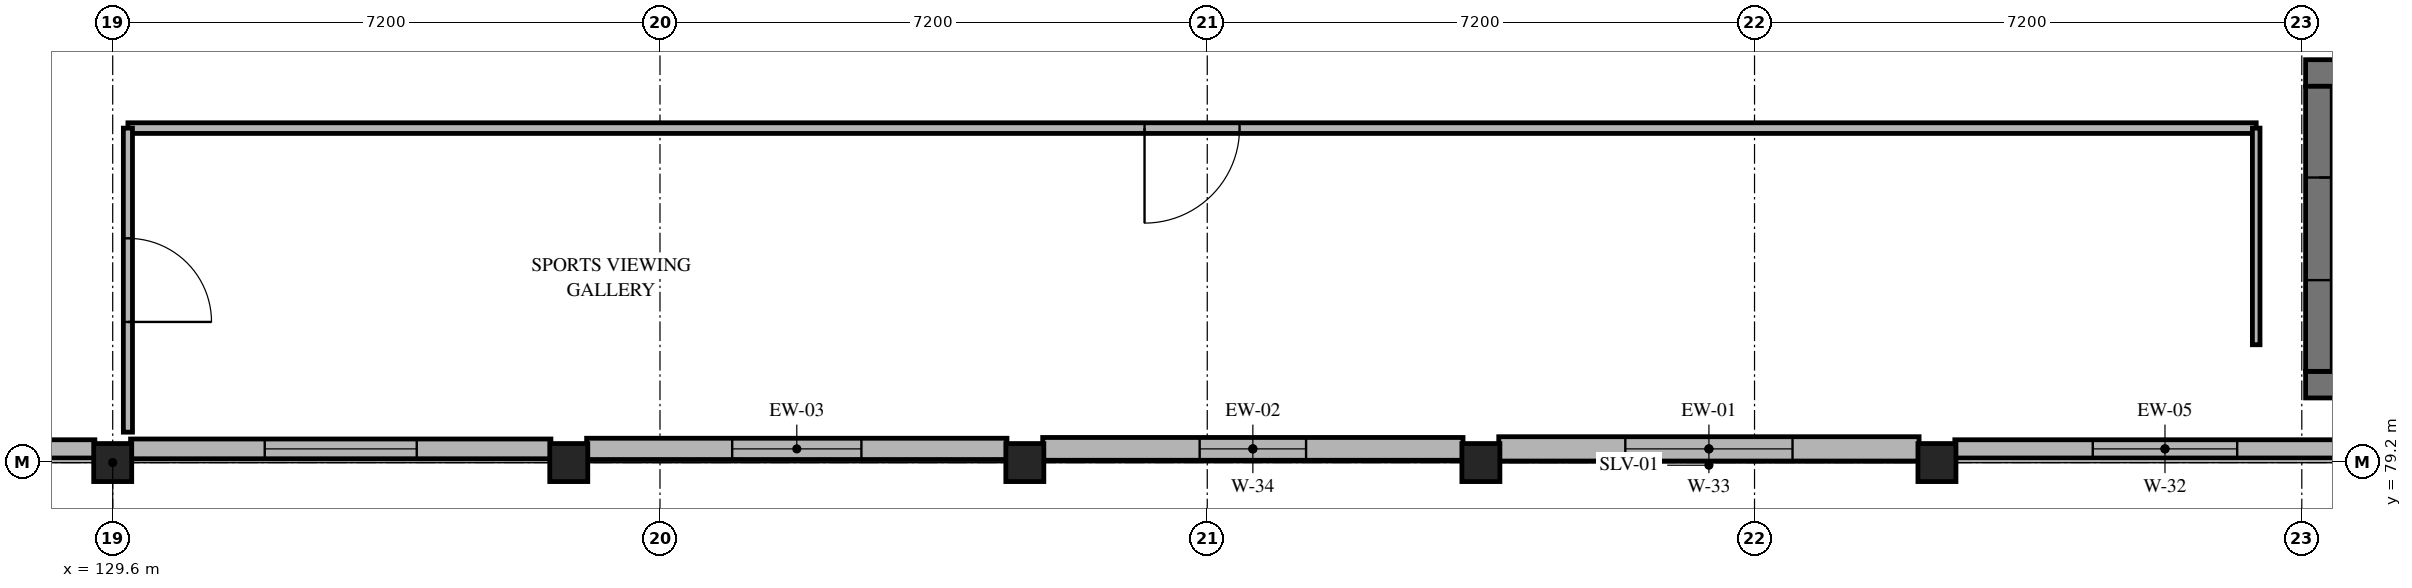
"""IFC4 building model, lengths in metres.
Left out: names, types, materials, properties, quantities, classifications, styles, units other than length and angle.
Written with IfcOpenShell. Run it as: python <this file> out.ifc"""

import sys

from ifc_helpers import new_model, si_unit, direction, frame, frame_2d, origin, origin_2d, place, context, subcontext, project, spatial, rectangle, extrude, element, fill, save


model = new_model("IFC4")
c1 = context("Model", 3, precision=1e-05, world=origin(), true_north=direction((0.0, 1.0)))
c2 = subcontext(c1, "Body", "Model", "MODEL_VIEW")
j1 = project(units=[si_unit("LENGTHUNIT", "METRE"), si_unit("PLANEANGLEUNIT", "RADIAN")], contexts=[c1])
p1 = place(None, origin())
s1 = spatial("IfcSite", under=j1, at=p1, CompositionType="ELEMENT")
p2 = place(p1, origin())
s2 = spatial("IfcBuilding", under=s1, at=p2, CompositionType="ELEMENT")
p3 = place(p2, frame((0.0, 0.0, 4.5)))
s3 = spatial("IfcBuildingStorey", under=s2, at=p3, CompositionType="ELEMENT", Elevation=4.5)
for number, where, z_axis, x_axis in (
    (1, (129.6, 79.2, 0.0), (0.0, 0.0, 1.0), (1.0, 0.0, 0.0)),
    (2, (135.6, 79.2, 0.0), (0.0, 0.0, 1.0), (1.0, 0.0, 0.0)),
    (3, (141.6, 79.2, 0.0), (0.0, 0.0, 1.0), (1.0, 0.0, 0.0)),
    (4, (147.6, 79.2, 0.0), (0.0, 0.0, 1.0), (1.0, 0.0, 0.0)),
    (5, (153.6, 79.2, 0.0), (0.0, 0.0, 1.0), (1.0, 0.0, 0.0)),
):
    element("IfcColumn", number, at=place(p3, frame(where, z_axis=z_axis, x_axis=x_axis)), inside=s3, PredefinedType="COLUMN", context=c2, shape_type="SweptSolid", body=[
        extrude(rectangle(XDim=0.5, YDim=0.5, at=origin_2d()), origin(), (0.0, 0.0, 1.0), 4.2),
    ])
p4 = place(p3, frame((159.365, 79.38, 0.0), z_axis=(0.0, 0.0, 1.0), x_axis=(-1.0, 0.0, 0.0)))
e6 = element("IfcWall", 6, at=p4, inside=s3, PredefinedType="SOLIDWALL", context=c2, shape_type="SweptSolid", body=[
    extrude(rectangle(XDim=5.53, YDim=0.24, at=frame_2d((2.765, 0.0))), origin(), (0.0, 0.0, 1.0), 3.59),
])
p5 = place(p4, frame((1.815, 0.0, 0.75)))
e7 = element("IfcOpeningElement", 7, at=p5, cuts=e6, PredefinedType="OPENING", context=c2, shape_type="SweptSolid", body=[
    extrude(rectangle(XDim=1.9, YDim=1.45, at=frame_2d((0.95, 0.725))), frame((0.0, 0.13, 0.0), z_axis=(0.0, -1.0, 0.0), x_axis=(1.0, 0.0, 0.0)), (0.0, 0.0, 1.0), 0.26),
])
p6 = place(p3, frame((153.365, 79.38, 0.0), z_axis=(0.0, 0.0, 1.0), x_axis=(-1.0, 0.0, 0.0)))
e8 = element("IfcWall", 8, at=p6, inside=s3, PredefinedType="SOLIDWALL", context=c2, shape_type="SweptSolid", body=[
    extrude(rectangle(XDim=5.53, YDim=0.32, at=frame_2d((2.765, 0.0))), origin(), (0.0, 0.0, 1.0), 3.59),
])
p7 = place(p6, frame((1.665, 0.0, 0.75)))
e9 = element("IfcOpeningElement", 9, at=p7, cuts=e8, PredefinedType="OPENING", context=c2, shape_type="SweptSolid", body=[
    extrude(rectangle(XDim=2.2, YDim=1.45, at=frame_2d((1.1, 0.725))), frame((0.0, 0.17, 0.0), z_axis=(0.0, -1.0, 0.0), x_axis=(1.0, 0.0, 0.0)), (0.0, 0.0, 1.0), 0.34),
])
p8 = place(p3, frame((147.365, 79.38, 0.0), z_axis=(0.0, 0.0, 1.0), x_axis=(-1.0, 0.0, 0.0)))
e10 = element("IfcWall", 10, at=p8, inside=s3, PredefinedType="SOLIDWALL", context=c2, shape_type="SweptSolid", body=[
    extrude(rectangle(XDim=5.53, YDim=0.3, at=frame_2d((2.765, 0.0))), origin(), (0.0, 0.0, 1.0), 3.59),
])
p9 = place(p8, frame((2.065, 0.0, 0.9)))
e11 = element("IfcOpeningElement", 11, at=p9, cuts=e10, PredefinedType="OPENING", context=c2, shape_type="SweptSolid", body=[
    extrude(rectangle(XDim=1.4, YDim=0.85, at=frame_2d((0.7, 0.425))), frame((0.0, 0.16, 0.0), z_axis=(0.0, -1.0, 0.0), x_axis=(1.0, 0.0, 0.0)), (0.0, 0.0, 1.0), 0.32),
])
p10 = place(p3, frame((141.365, 79.38, 0.0), z_axis=(0.0, 0.0, 1.0), x_axis=(-1.0, 0.0, 0.0)))
e12 = element("IfcWall", 12, at=p10, inside=s3, PredefinedType="SOLIDWALL", context=c2, shape_type="SweptSolid", body=[
    extrude(rectangle(XDim=5.53, YDim=0.28, at=frame_2d((2.765, 0.0))), origin(), (0.0, 0.0, 1.0), 3.59),
])
p11 = place(p10, frame((1.915, 0.0, 0.9)))
e13 = element("IfcOpeningElement", 13, at=p11, cuts=e12, PredefinedType="OPENING", context=c2, shape_type="SweptSolid", body=[
    extrude(rectangle(XDim=1.7, YDim=0.85, at=frame_2d((0.85, 0.425))), frame((0.0, 0.15, 0.0), z_axis=(0.0, -1.0, 0.0), x_axis=(1.0, 0.0, 0.0)), (0.0, 0.0, 1.0), 0.3),
])
p12 = place(p3, frame((135.365, 79.38, 0.0), z_axis=(0.0, 0.0, 1.0), x_axis=(-1.0, 0.0, 0.0)))
e14 = element("IfcWall", 14, at=p12, inside=s3, PredefinedType="SOLIDWALL", context=c2, shape_type="SweptSolid", body=[
    extrude(rectangle(XDim=5.53, YDim=0.26, at=frame_2d((2.765, 0.0))), origin(), (0.0, 0.0, 1.0), 3.59),
])
p13 = place(p12, frame((1.765, 0.0, 0.9)))
e15 = element("IfcOpeningElement", 15, at=p13, cuts=e14, PredefinedType="OPENING", context=c2, shape_type="SweptSolid", body=[
    extrude(rectangle(XDim=2.0, YDim=0.85, at=frame_2d((1.0, 0.425))), frame((0.0, 0.14, 0.0), z_axis=(0.0, -1.0, 0.0), x_axis=(1.0, 0.0, 0.0)), (0.0, 0.0, 1.0), 0.28),
])
p14 = place(p3, frame((129.365, 79.38, 0.0), z_axis=(0.0, 0.0, 1.0), x_axis=(-1.0, 0.0, 0.0)))
e16 = element("IfcWall", 16, at=p14, inside=s3, PredefinedType="SOLIDWALL", context=c2, shape_type="SweptSolid", body=[
    extrude(rectangle(XDim=6.73, YDim=0.24, at=frame_2d((3.365, 0.0))), origin(), (0.0, 0.0, 1.0), 3.5),
])
p15 = place(p14, frame((2.915, 0.0, 0.9)))
e17 = element("IfcOpeningElement", 17, at=p15, cuts=e16, PredefinedType="OPENING", context=c2, shape_type="SweptSolid", body=[
    extrude(rectangle(XDim=0.9, YDim=1.2, at=frame_2d((0.45, 0.6))), frame((0.0, 0.13, 0.0), z_axis=(0.0, -1.0, 0.0), x_axis=(1.0, 0.0, 0.0)), (0.0, 0.0, 1.0), 0.26),
])
for number, where, z_axis, x_axis in (
    (18, (158.45, 80.225, 0.0), (0.0, 0.0, 1.0), (1.0, 0.0, 0.0)),
    (19, (167.55, 84.325, 0.0), (0.0, 0.0, 1.0), (-1.0, 0.0, 0.0)),
):
    element("IfcWall", number, at=place(p3, frame(where, z_axis=z_axis, x_axis=x_axis)), inside=s3, PredefinedType="SHEAR", context=c2, shape_type="SweptSolid", body=[
        extrude(rectangle(XDim=9.1, YDim=0.35, at=frame_2d((4.55, 0.0))), origin(), (0.0, 0.0, 1.0), 3.95),
    ])
p16 = place(p3, frame((158.625, 84.15, 0.0), z_axis=(0.0, 0.0, 1.0), x_axis=(0.0, -1.0, 0.0)))
e20 = element("IfcWall", 20, at=p16, inside=s3, PredefinedType="SHEAR", context=c2, shape_type="SweptSolid", body=[
    extrude(rectangle(XDim=3.75, YDim=0.35, at=frame_2d((1.875, 0.0))), origin(), (0.0, 0.0, 1.0), 3.95),
])
p17 = place(p16, frame((1.2, 0.0, 0.0)))
e21 = element("IfcOpeningElement", 21, at=p17, cuts=e20, PredefinedType="OPENING", context=c2, shape_type="SweptSolid", body=[
    extrude(rectangle(XDim=1.35, YDim=2.2, at=frame_2d((0.675, 1.1))), frame((0.0, 0.185, 0.0), z_axis=(0.0, -1.0, 0.0), x_axis=(1.0, 0.0, 0.0)), (0.0, 0.0, 1.0), 0.37),
])
p18 = place(p3, frame((157.8, 83.6, 0.0), z_axis=(0.0, 0.0, 1.0), x_axis=(-1.0, 0.0, 0.0)))
e22 = element("IfcWall", 22, at=p18, inside=s3, PredefinedType="PARTITIONING", context=c2, shape_type="SweptSolid", body=[
    extrude(rectangle(XDim=28.0, YDim=0.14, at=frame_2d((14.0, 0.0))), origin(), (0.0, 0.0, 1.0), 3.55),
])
p19 = place(p18, frame((13.375, 0.0, 0.0)))
e23 = element("IfcOpeningElement", 23, at=p19, cuts=e22, PredefinedType="OPENING", context=c2, shape_type="SweptSolid", body=[
    extrude(rectangle(XDim=1.25, YDim=2.2, at=frame_2d((0.625, 1.1))), frame((0.0, 0.08, 0.0), z_axis=(0.0, -1.0, 0.0), x_axis=(1.0, 0.0, 0.0)), (0.0, 0.0, 1.0), 0.16),
])
p20 = place(p3, frame((129.8, 83.6, 0.0), z_axis=(0.0, 0.0, 1.0), x_axis=(0.0, -1.0, 0.0)))
e24 = element("IfcWall", 24, at=p20, inside=s3, PredefinedType="PARTITIONING", context=c2, shape_type="SweptSolid", body=[
    extrude(rectangle(XDim=4.0, YDim=0.12, at=frame_2d((2.0, 0.0))), origin(), (0.0, 0.0, 1.0), 3.65),
])
p21 = place(p20, frame((1.45, 0.0, 0.0)))
e25 = element("IfcOpeningElement", 25, at=p21, cuts=e24, PredefinedType="OPENING", context=c2, shape_type="SweptSolid", body=[
    extrude(rectangle(XDim=1.1, YDim=2.15, at=frame_2d((0.55, 1.075))), frame((0.0, 0.07, 0.0), z_axis=(0.0, -1.0, 0.0), x_axis=(1.0, 0.0, 0.0)), (0.0, 0.0, 1.0), 0.14),
])
p22 = place(p3, frame((157.8, 80.75, 0.0), z_axis=(0.0, 0.0, 1.0), x_axis=(0.0, 1.0, 0.0)))
e26 = element("IfcWall", 26, at=p22, inside=s3, PredefinedType="PARTITIONING", context=c2, shape_type="SweptSolid", body=[
    extrude(rectangle(XDim=2.85, YDim=0.1, at=frame_2d((1.425, 0.0))), origin(), (0.0, 0.0, 1.0), 3.95),
])
p23 = place(p5, origin())
e27 = element("IfcWindow", 27, at=p23, inside=s3, PartitioningType="SINGLE_PANEL", PredefinedType="WINDOW", context=c2, shape_type="SweptSolid", body=[
    extrude(rectangle(XDim=1.9, YDim=1.45, at=frame_2d((0.95, 0.725))), frame((0.0, 0.03, 0.0), z_axis=(0.0, -1.0, 0.0), x_axis=(1.0, 0.0, 0.0)), (0.0, 0.0, 1.0), 0.06),
])
fill(e7, e27)
p24 = place(p7, origin())
e28 = element("IfcWindow", 28, at=p24, inside=s3, PartitioningType="SINGLE_PANEL", PredefinedType="WINDOW", context=c2, shape_type="SweptSolid", body=[
    extrude(rectangle(XDim=2.2, YDim=1.45, at=frame_2d((1.1, 0.725))), frame((0.0, 0.03, 0.0), z_axis=(0.0, -1.0, 0.0), x_axis=(1.0, 0.0, 0.0)), (0.0, 0.0, 1.0), 0.06),
])
fill(e9, e28)
p25 = place(p9, origin())
e29 = element("IfcWindow", 29, at=p25, inside=s3, PartitioningType="SINGLE_PANEL", PredefinedType="WINDOW", context=c2, shape_type="SweptSolid", body=[
    extrude(rectangle(XDim=1.4, YDim=0.85, at=frame_2d((0.7, 0.425))), frame((0.0, 0.03, 0.0), z_axis=(0.0, -1.0, 0.0), x_axis=(1.0, 0.0, 0.0)), (0.0, 0.0, 1.0), 0.06),
])
fill(e11, e29)
p26 = place(p11, origin())
e30 = element("IfcWindow", 30, at=p26, inside=s3, PartitioningType="SINGLE_PANEL", PredefinedType="WINDOW", context=c2, shape_type="SweptSolid", body=[
    extrude(rectangle(XDim=1.7, YDim=0.85, at=frame_2d((0.85, 0.425))), frame((0.0, 0.03, 0.0), z_axis=(0.0, -1.0, 0.0), x_axis=(1.0, 0.0, 0.0)), (0.0, 0.0, 1.0), 0.06),
])
fill(e13, e30)
p27 = place(p13, origin())
e31 = element("IfcWindow", 31, at=p27, inside=s3, PartitioningType="SINGLE_PANEL", PredefinedType="WINDOW", context=c2, shape_type="SweptSolid", body=[
    extrude(rectangle(XDim=2.0, YDim=0.85, at=frame_2d((1.0, 0.425))), frame((0.0, 0.03, 0.0), z_axis=(0.0, -1.0, 0.0), x_axis=(1.0, 0.0, 0.0)), (0.0, 0.0, 1.0), 0.06),
])
fill(e15, e31)
p28 = place(p17, origin())
e32 = element("IfcDoor", 32, at=p28, inside=s3, OperationType="SINGLE_SWING_LEFT", PredefinedType="DOOR", context=c2, shape_type="SweptSolid", body=[
    extrude(rectangle(XDim=1.35, YDim=2.2, at=frame_2d((0.675, 1.1))), frame((0.0, 0.025, 0.0), z_axis=(0.0, -1.0, 0.0), x_axis=(1.0, 0.0, 0.0)), (0.0, 0.0, 1.0), 0.05),
])
fill(e21, e32)
p29 = place(p19, origin())
e33 = element("IfcDoor", 33, at=p29, inside=s3, OperationType="SINGLE_SWING_RIGHT", PredefinedType="DOOR", context=c2, shape_type="SweptSolid", body=[
    extrude(rectangle(XDim=1.25, YDim=2.2, at=frame_2d((0.625, 1.1))), frame((0.0, 0.025, 0.0), z_axis=(0.0, -1.0, 0.0), x_axis=(1.0, 0.0, 0.0)), (0.0, 0.0, 1.0), 0.05),
])
fill(e23, e33)
p30 = place(p21, origin())
e34 = element("IfcDoor", 34, at=p30, inside=s3, OperationType="SINGLE_SWING_RIGHT", PredefinedType="DOOR", context=c2, shape_type="SweptSolid", body=[
    extrude(rectangle(XDim=1.1, YDim=2.15, at=frame_2d((0.55, 1.075))), frame((0.0, 0.025, 0.0), z_axis=(0.0, -1.0, 0.0), x_axis=(1.0, 0.0, 0.0)), (0.0, 0.0, 1.0), 0.05),
])
fill(e25, e34)
save(model, sys.argv[1])
